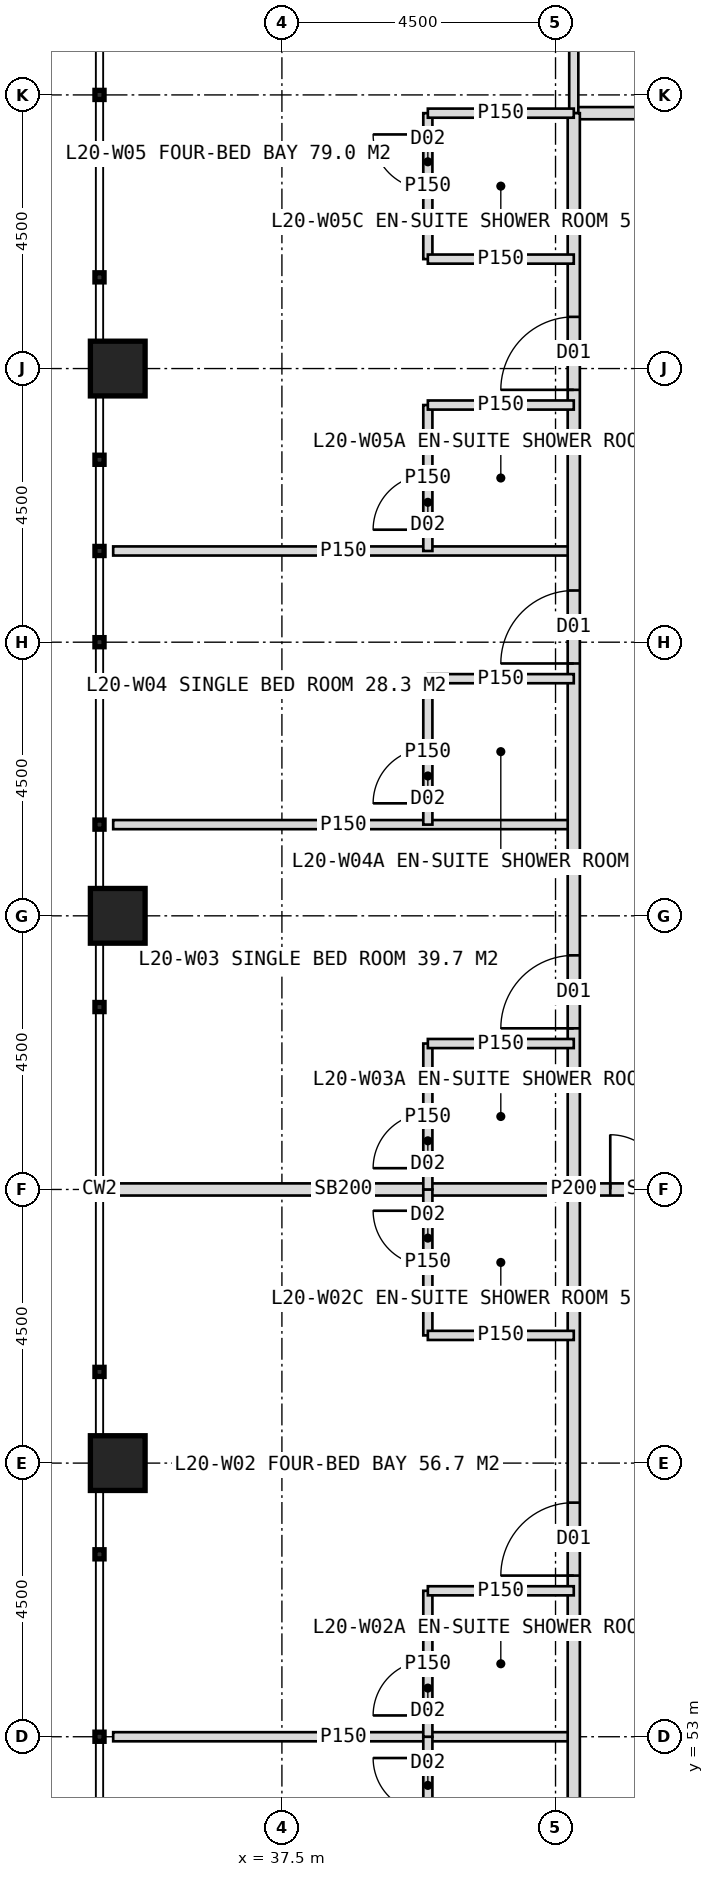
"""IFC4 building model, lengths in metres.
Left out: names, types, materials, properties, quantities, classifications, styles, units other than length and angle.
Written with IfcOpenShell. Run it as: python <this file> out.ifc"""

import sys

from ifc_helpers import new_model, si_unit, direction, frame, frame_2d, origin, origin_2d, place, context, subcontext, project, spatial, rectangle, hollow_rectangle, extrude, element, fill, save


model = new_model("IFC4")
c1 = context("Model", 3, precision=1e-05, world=origin(), true_north=direction((0.0, 1.0)))
c2 = subcontext(c1, "Body", "Model", "MODEL_VIEW")
j1 = project(units=[si_unit("LENGTHUNIT", "METRE"), si_unit("PLANEANGLEUNIT", "RADIAN")], contexts=[c1])
p1 = place(None, origin())
s1 = spatial("IfcSite", under=j1, at=p1, CompositionType="ELEMENT")
p2 = place(p1, origin())
s2 = spatial("IfcBuilding", under=s1, at=p2, CompositionType="ELEMENT")
p3 = place(p2, frame((0.0, 0.0, 87.0)))
s3 = spatial("IfcBuildingStorey", under=s2, at=p3, CompositionType="ELEMENT", Elevation=87.0)
for number, where, z_axis, x_axis in (
    (1, (34.8, 57.5, 0.0), (0.0, 0.0, 1.0), (1.0, 0.0, 0.0)),
    (2, (34.8, 66.5, 0.0), (0.0, 0.0, 1.0), (1.0, 0.0, 0.0)),
    (3, (34.8, 75.5, 0.0), (0.0, 0.0, 1.0), (1.0, 0.0, 0.0)),
):
    element("IfcColumn", number, at=place(p3, frame(where, z_axis=z_axis, x_axis=x_axis)), inside=s3, PredefinedType="COLUMN", context=c2, shape_type="SweptSolid", body=[
        extrude(hollow_rectangle(XDim=0.9, YDim=0.9, WallThickness=0.08, at=origin_2d()), origin(), (0.0, 0.0, 1.0), 4.0),
    ])
p4 = place(p3, frame((42.3, 79.7, 0.0), z_axis=(0.0, 0.0, 1.0), x_axis=(1.0, 0.0, 0.0)))
e4 = element("IfcWall", 4, at=p4, inside=s3, PredefinedType="PARTITIONING", context=c2, shape_type="SweptSolid", body=[
    extrude(rectangle(XDim=35.4, YDim=0.2, at=frame_2d((17.7, 0.0))), origin(), (0.0, 0.0, 1.0), 3.75),
])
p5 = place(p4, frame((2.65, 0.0, 0.0)))
e5 = element("IfcOpeningElement", 5, at=p5, cuts=e4, PredefinedType="OPENING", context=c2, shape_type="SweptSolid", body=[
    extrude(rectangle(XDim=1.2, YDim=2.2, at=frame_2d((0.6, 1.1))), frame((0.0, 0.11, 0.0), z_axis=(0.0, -1.0, 0.0), x_axis=(1.0, 0.0, 0.0)), (0.0, 0.0, 1.0), 0.22),
])
p6 = place(p4, frame((11.2, 0.0, 0.0)))
e6 = element("IfcOpeningElement", 6, at=p6, cuts=e4, PredefinedType="OPENING", context=c2, shape_type="SweptSolid", body=[
    extrude(rectangle(XDim=1.0, YDim=2.1, at=frame_2d((0.5, 1.05))), frame((0.0, 0.11, 0.0), z_axis=(0.0, -1.0, 0.0), x_axis=(1.0, 0.0, 0.0)), (0.0, 0.0, 1.0), 0.22),
])
p7 = place(p4, frame((17.2, 0.0, 0.0)))
e7 = element("IfcOpeningElement", 7, at=p7, cuts=e4, PredefinedType="OPENING", context=c2, shape_type="SweptSolid", body=[
    extrude(rectangle(XDim=1.0, YDim=2.1, at=frame_2d((0.5, 1.05))), frame((0.0, 0.11, 0.0), z_axis=(0.0, -1.0, 0.0), x_axis=(1.0, 0.0, 0.0)), (0.0, 0.0, 1.0), 0.22),
])
p8 = place(p4, frame((23.35, 0.0, 0.0)))
e8 = element("IfcOpeningElement", 8, at=p8, cuts=e4, PredefinedType="OPENING", context=c2, shape_type="SweptSolid", body=[
    extrude(rectangle(XDim=1.2, YDim=2.2, at=frame_2d((0.6, 1.1))), frame((0.0, 0.11, 0.0), z_axis=(0.0, -1.0, 0.0), x_axis=(1.0, 0.0, 0.0)), (0.0, 0.0, 1.0), 0.22),
])
p9 = place(p4, frame((29.35, 0.0, 0.0)))
e9 = element("IfcOpeningElement", 9, at=p9, cuts=e4, PredefinedType="OPENING", context=c2, shape_type="SweptSolid", body=[
    extrude(rectangle(XDim=1.2, YDim=2.2, at=frame_2d((0.6, 1.1))), frame((0.0, 0.11, 0.0), z_axis=(0.0, -1.0, 0.0), x_axis=(1.0, 0.0, 0.0)), (0.0, 0.0, 1.0), 0.22),
])
for number, where, z_axis, x_axis in (
    (10, (42.3, 79.7, 0.0), (0.0, 0.0, 1.0), (0.0, 1.0, 0.0)),
    (11, (42.3, 53.0, 0.0), (0.0, 0.0, 1.0), (-1.0, 0.0, 0.0)),
):
    element("IfcWall", number, at=place(p3, frame(where, z_axis=z_axis, x_axis=x_axis)), inside=s3, PredefinedType="PARTITIONING", context=c2, shape_type="SweptSolid", body=[
        extrude(rectangle(XDim=7.575, YDim=0.15, at=frame_2d((3.788, 0.0))), origin(), (0.0, 0.0, 1.0), 3.75),
    ])
p10 = place(p3, frame((42.3, 62.0, 0.0), z_axis=(0.0, 0.0, 1.0), x_axis=(-1.0, 0.0, 0.0)))
e12 = element("IfcWall", 12, at=p10, inside=s3, PredefinedType="SOLIDWALL", context=c2, shape_type="SweptSolid", body=[
    extrude(rectangle(XDim=7.575, YDim=0.2, at=frame_2d((3.788, 0.0))), origin(), (0.0, 0.0, 1.0), 2.75),
])
for number, where, z_axis, x_axis in (
    (13, (42.3, 68.0, 0.0), (0.0, 0.0, 1.0), (-1.0, 0.0, 0.0)),
    (14, (42.3, 72.5, 0.0), (0.0, 0.0, 1.0), (-1.0, 0.0, 0.0)),
):
    element("IfcWall", number, at=place(p3, frame(where, z_axis=z_axis, x_axis=x_axis)), inside=s3, PredefinedType="PARTITIONING", context=c2, shape_type="SweptSolid", body=[
        extrude(rectangle(XDim=7.575, YDim=0.15, at=frame_2d((3.788, 0.0))), origin(), (0.0, 0.0, 1.0), 3.75),
    ])
p11 = place(p3, frame((42.3, 44.3, 0.0), z_axis=(0.0, 0.0, 1.0), x_axis=(0.0, 1.0, 0.0)))
e15 = element("IfcWall", 15, at=p11, inside=s3, PredefinedType="PARTITIONING", context=c2, shape_type="SweptSolid", body=[
    extrude(rectangle(XDim=35.4, YDim=0.2, at=frame_2d((17.7, 0.0))), origin(), (0.0, 0.0, 1.0), 3.75),
])
p12 = place(p11, frame((2.65, 0.0, 0.0)))
e16 = element("IfcOpeningElement", 16, at=p12, cuts=e15, PredefinedType="OPENING", context=c2, shape_type="SweptSolid", body=[
    extrude(rectangle(XDim=1.2, YDim=2.2, at=frame_2d((0.6, 1.1))), frame((0.0, 0.11, 0.0), z_axis=(0.0, -1.0, 0.0), x_axis=(1.0, 0.0, 0.0)), (0.0, 0.0, 1.0), 0.22),
])
p13 = place(p11, frame((11.35, 0.0, 0.0)))
e17 = element("IfcOpeningElement", 17, at=p13, cuts=e15, PredefinedType="OPENING", context=c2, shape_type="SweptSolid", body=[
    extrude(rectangle(XDim=1.2, YDim=2.2, at=frame_2d((0.6, 1.1))), frame((0.0, 0.11, 0.0), z_axis=(0.0, -1.0, 0.0), x_axis=(1.0, 0.0, 0.0)), (0.0, 0.0, 1.0), 0.22),
])
p14 = place(p11, frame((20.35, 0.0, 0.0)))
e18 = element("IfcOpeningElement", 18, at=p14, cuts=e15, PredefinedType="OPENING", context=c2, shape_type="SweptSolid", body=[
    extrude(rectangle(XDim=1.2, YDim=2.2, at=frame_2d((0.6, 1.1))), frame((0.0, 0.11, 0.0), z_axis=(0.0, -1.0, 0.0), x_axis=(1.0, 0.0, 0.0)), (0.0, 0.0, 1.0), 0.22),
])
p15 = place(p11, frame((26.35, 0.0, 0.0)))
e19 = element("IfcOpeningElement", 19, at=p15, cuts=e15, PredefinedType="OPENING", context=c2, shape_type="SweptSolid", body=[
    extrude(rectangle(XDim=1.2, YDim=2.2, at=frame_2d((0.6, 1.1))), frame((0.0, 0.11, 0.0), z_axis=(0.0, -1.0, 0.0), x_axis=(1.0, 0.0, 0.0)), (0.0, 0.0, 1.0), 0.22),
])
p16 = place(p11, frame((30.85, 0.0, 0.0)))
e20 = element("IfcOpeningElement", 20, at=p16, cuts=e15, PredefinedType="OPENING", context=c2, shape_type="SweptSolid", body=[
    extrude(rectangle(XDim=1.2, YDim=2.2, at=frame_2d((0.6, 1.1))), frame((0.0, 0.11, 0.0), z_axis=(0.0, -1.0, 0.0), x_axis=(1.0, 0.0, 0.0)), (0.0, 0.0, 1.0), 0.22),
])
p17 = place(p3, frame((39.9, 50.6, 0.0), z_axis=(0.0, 0.0, 1.0), x_axis=(0.0, 1.0, 0.0)))
e21 = element("IfcWall", 21, at=p17, inside=s3, PredefinedType="PARTITIONING", context=c2, shape_type="SweptSolid", body=[
    extrude(rectangle(XDim=2.4, YDim=0.15, at=frame_2d((1.2, 0.0))), origin(), (0.0, 0.0, 1.0), 3.75),
])
p18 = place(p17, frame((1.15, 0.0, 0.0)))
e22 = element("IfcOpeningElement", 22, at=p18, cuts=e21, PredefinedType="OPENING", context=c2, shape_type="SweptSolid", body=[
    extrude(rectangle(XDim=0.9, YDim=2.1, at=frame_2d((0.45, 1.05))), frame((0.0, 0.085, 0.0), z_axis=(0.0, -1.0, 0.0), x_axis=(1.0, 0.0, 0.0)), (0.0, 0.0, 1.0), 0.17),
])
p19 = place(p3, frame((39.9, 53.0, 0.0), z_axis=(0.0, 0.0, 1.0), x_axis=(0.0, 1.0, 0.0)))
e23 = element("IfcWall", 23, at=p19, inside=s3, PredefinedType="PARTITIONING", context=c2, shape_type="SweptSolid", body=[
    extrude(rectangle(XDim=2.4, YDim=0.15, at=frame_2d((1.2, 0.0))), origin(), (0.0, 0.0, 1.0), 3.75),
])
p20 = place(p19, frame((0.35, 0.0, 0.0)))
e24 = element("IfcOpeningElement", 24, at=p20, cuts=e23, PredefinedType="OPENING", context=c2, shape_type="SweptSolid", body=[
    extrude(rectangle(XDim=0.9, YDim=2.1, at=frame_2d((0.45, 1.05))), frame((0.0, 0.085, 0.0), z_axis=(0.0, -1.0, 0.0), x_axis=(1.0, 0.0, 0.0)), (0.0, 0.0, 1.0), 0.17),
])
p21 = place(p3, frame((42.3, 55.4, 0.0), z_axis=(0.0, 0.0, 1.0), x_axis=(-1.0, 0.0, 0.0)))
e25 = element("IfcWall", 25, at=p21, inside=s3, PredefinedType="PARTITIONING", context=c2, shape_type="SweptSolid", body=[
    extrude(rectangle(XDim=2.4, YDim=0.15, at=frame_2d((1.2, 0.0))), origin(), (0.0, 0.0, 1.0), 3.75),
])
p22 = place(p3, frame((39.9, 59.6, 0.0), z_axis=(0.0, 0.0, 1.0), x_axis=(0.0, 1.0, 0.0)))
e26 = element("IfcWall", 26, at=p22, inside=s3, PredefinedType="PARTITIONING", context=c2, shape_type="SweptSolid", body=[
    extrude(rectangle(XDim=2.4, YDim=0.15, at=frame_2d((1.2, 0.0))), origin(), (0.0, 0.0, 1.0), 3.75),
])
p23 = place(p22, frame((1.15, 0.0, 0.0)))
e27 = element("IfcOpeningElement", 27, at=p23, cuts=e26, PredefinedType="OPENING", context=c2, shape_type="SweptSolid", body=[
    extrude(rectangle(XDim=0.9, YDim=2.1, at=frame_2d((0.45, 1.05))), frame((0.0, 0.085, 0.0), z_axis=(0.0, -1.0, 0.0), x_axis=(1.0, 0.0, 0.0)), (0.0, 0.0, 1.0), 0.17),
])
p24 = place(p3, frame((42.3, 59.6, 0.0), z_axis=(0.0, 0.0, 1.0), x_axis=(-1.0, 0.0, 0.0)))
e28 = element("IfcWall", 28, at=p24, inside=s3, PredefinedType="PARTITIONING", context=c2, shape_type="SweptSolid", body=[
    extrude(rectangle(XDim=2.4, YDim=0.15, at=frame_2d((1.2, 0.0))), origin(), (0.0, 0.0, 1.0), 3.75),
])
p25 = place(p3, frame((39.9, 62.0, 0.0), z_axis=(0.0, 0.0, 1.0), x_axis=(0.0, 1.0, 0.0)))
e29 = element("IfcWall", 29, at=p25, inside=s3, PredefinedType="PARTITIONING", context=c2, shape_type="SweptSolid", body=[
    extrude(rectangle(XDim=2.4, YDim=0.15, at=frame_2d((1.2, 0.0))), origin(), (0.0, 0.0, 1.0), 3.75),
])
p26 = place(p25, frame((0.35, 0.0, 0.0)))
e30 = element("IfcOpeningElement", 30, at=p26, cuts=e29, PredefinedType="OPENING", context=c2, shape_type="SweptSolid", body=[
    extrude(rectangle(XDim=0.9, YDim=2.1, at=frame_2d((0.45, 1.05))), frame((0.0, 0.085, 0.0), z_axis=(0.0, -1.0, 0.0), x_axis=(1.0, 0.0, 0.0)), (0.0, 0.0, 1.0), 0.17),
])
p27 = place(p3, frame((42.3, 64.4, 0.0), z_axis=(0.0, 0.0, 1.0), x_axis=(-1.0, 0.0, 0.0)))
e31 = element("IfcWall", 31, at=p27, inside=s3, PredefinedType="PARTITIONING", context=c2, shape_type="SweptSolid", body=[
    extrude(rectangle(XDim=2.4, YDim=0.15, at=frame_2d((1.2, 0.0))), origin(), (0.0, 0.0, 1.0), 3.75),
])
p28 = place(p3, frame((39.9, 68.0, 0.0), z_axis=(0.0, 0.0, 1.0), x_axis=(0.0, 1.0, 0.0)))
e32 = element("IfcWall", 32, at=p28, inside=s3, PredefinedType="PARTITIONING", context=c2, shape_type="SweptSolid", body=[
    extrude(rectangle(XDim=2.4, YDim=0.15, at=frame_2d((1.2, 0.0))), origin(), (0.0, 0.0, 1.0), 3.75),
])
p29 = place(p28, frame((0.35, 0.0, 0.0)))
e33 = element("IfcOpeningElement", 33, at=p29, cuts=e32, PredefinedType="OPENING", context=c2, shape_type="SweptSolid", body=[
    extrude(rectangle(XDim=0.9, YDim=2.1, at=frame_2d((0.45, 1.05))), frame((0.0, 0.085, 0.0), z_axis=(0.0, -1.0, 0.0), x_axis=(1.0, 0.0, 0.0)), (0.0, 0.0, 1.0), 0.17),
])
p30 = place(p3, frame((42.3, 70.4, 0.0), z_axis=(0.0, 0.0, 1.0), x_axis=(-1.0, 0.0, 0.0)))
e34 = element("IfcWall", 34, at=p30, inside=s3, PredefinedType="PARTITIONING", context=c2, shape_type="SweptSolid", body=[
    extrude(rectangle(XDim=2.4, YDim=0.15, at=frame_2d((1.2, 0.0))), origin(), (0.0, 0.0, 1.0), 3.75),
])
p31 = place(p3, frame((39.9, 72.5, 0.0), z_axis=(0.0, 0.0, 1.0), x_axis=(0.0, 1.0, 0.0)))
e35 = element("IfcWall", 35, at=p31, inside=s3, PredefinedType="PARTITIONING", context=c2, shape_type="SweptSolid", body=[
    extrude(rectangle(XDim=2.4, YDim=0.15, at=frame_2d((1.2, 0.0))), origin(), (0.0, 0.0, 1.0), 3.75),
])
p32 = place(p31, frame((0.35, 0.0, 0.0)))
e36 = element("IfcOpeningElement", 36, at=p32, cuts=e35, PredefinedType="OPENING", context=c2, shape_type="SweptSolid", body=[
    extrude(rectangle(XDim=0.9, YDim=2.1, at=frame_2d((0.45, 1.05))), frame((0.0, 0.085, 0.0), z_axis=(0.0, -1.0, 0.0), x_axis=(1.0, 0.0, 0.0)), (0.0, 0.0, 1.0), 0.17),
])
p33 = place(p3, frame((42.3, 74.9, 0.0), z_axis=(0.0, 0.0, 1.0), x_axis=(-1.0, 0.0, 0.0)))
e37 = element("IfcWall", 37, at=p33, inside=s3, PredefinedType="PARTITIONING", context=c2, shape_type="SweptSolid", body=[
    extrude(rectangle(XDim=2.4, YDim=0.15, at=frame_2d((1.2, 0.0))), origin(), (0.0, 0.0, 1.0), 3.75),
])
p34 = place(p3, frame((39.9, 77.3, 0.0), z_axis=(0.0, 0.0, 1.0), x_axis=(0.0, 1.0, 0.0)))
e38 = element("IfcWall", 38, at=p34, inside=s3, PredefinedType="PARTITIONING", context=c2, shape_type="SweptSolid", body=[
    extrude(rectangle(XDim=2.4, YDim=0.15, at=frame_2d((1.2, 0.0))), origin(), (0.0, 0.0, 1.0), 3.75),
])
p35 = place(p34, frame((1.15, 0.0, 0.0)))
e39 = element("IfcOpeningElement", 39, at=p35, cuts=e38, PredefinedType="OPENING", context=c2, shape_type="SweptSolid", body=[
    extrude(rectangle(XDim=0.9, YDim=2.1, at=frame_2d((0.45, 1.05))), frame((0.0, 0.085, 0.0), z_axis=(0.0, -1.0, 0.0), x_axis=(1.0, 0.0, 0.0)), (0.0, 0.0, 1.0), 0.17),
])
for number, where, z_axis, x_axis in (
    (40, (42.3, 77.3, 0.0), (0.0, 0.0, 1.0), (-1.0, 0.0, 0.0)),
    (41, (42.3, 79.7, 0.0), (0.0, 0.0, 1.0), (-1.0, 0.0, 0.0)),
):
    element("IfcWall", number, at=place(p3, frame(where, z_axis=z_axis, x_axis=x_axis)), inside=s3, PredefinedType="PARTITIONING", context=c2, shape_type="SweptSolid", body=[
        extrude(rectangle(XDim=2.4, YDim=0.15, at=frame_2d((1.2, 0.0))), origin(), (0.0, 0.0, 1.0), 3.75),
    ])
p36 = place(p3, frame((45.0, 62.0, 0.0), z_axis=(0.0, 0.0, 1.0), x_axis=(-1.0, 0.0, 0.0)))
e42 = element("IfcWall", 42, at=p36, inside=s3, PredefinedType="SOLIDWALL", context=c2, shape_type="SweptSolid", body=[
    extrude(rectangle(XDim=2.7, YDim=0.2, at=frame_2d((1.35, 0.0))), origin(), (0.0, 0.0, 1.0), 2.75),
])
p37 = place(p36, frame((0.3, 0.0, 0.0)))
e43 = element("IfcOpeningElement", 43, at=p37, cuts=e42, PredefinedType="OPENING", context=c2, shape_type="SweptSolid", body=[
    extrude(rectangle(XDim=1.8, YDim=2.2, at=frame_2d((0.9, 1.1))), frame((0.0, 0.11, 0.0), z_axis=(0.0, -1.0, 0.0), x_axis=(1.0, 0.0, 0.0)), (0.0, 0.0, 1.0), 0.22),
])
p38 = place(p18, origin())
e44 = element("IfcDoor", 44, at=p38, inside=s3, OperationType="SINGLE_SWING_RIGHT", PredefinedType="DOOR", context=c2, shape_type="SweptSolid", body=[
    extrude(rectangle(XDim=0.9, YDim=2.1, at=frame_2d((0.45, 1.05))), frame((0.0, 0.025, 0.0), z_axis=(0.0, -1.0, 0.0), x_axis=(1.0, 0.0, 0.0)), (0.0, 0.0, 1.0), 0.05),
])
fill(e22, e44)
p39 = place(p13, origin())
e45 = element("IfcDoor", 45, at=p39, inside=s3, OperationType="SINGLE_SWING_LEFT", PredefinedType="DOOR", context=c2, shape_type="SweptSolid", body=[
    extrude(rectangle(XDim=1.2, YDim=2.2, at=frame_2d((0.6, 1.1))), frame((0.0, 0.025, 0.0), z_axis=(0.0, -1.0, 0.0), x_axis=(1.0, 0.0, 0.0)), (0.0, 0.0, 1.0), 0.05),
])
fill(e17, e45)
p40 = place(p20, origin())
e46 = element("IfcDoor", 46, at=p40, inside=s3, OperationType="SINGLE_SWING_LEFT", PredefinedType="DOOR", context=c2, shape_type="SweptSolid", body=[
    extrude(rectangle(XDim=0.9, YDim=2.1, at=frame_2d((0.45, 1.05))), frame((0.0, 0.025, 0.0), z_axis=(0.0, -1.0, 0.0), x_axis=(1.0, 0.0, 0.0)), (0.0, 0.0, 1.0), 0.05),
])
fill(e24, e46)
p41 = place(p23, origin())
e47 = element("IfcDoor", 47, at=p41, inside=s3, OperationType="SINGLE_SWING_RIGHT", PredefinedType="DOOR", context=c2, shape_type="SweptSolid", body=[
    extrude(rectangle(XDim=0.9, YDim=2.1, at=frame_2d((0.45, 1.05))), frame((0.0, 0.025, 0.0), z_axis=(0.0, -1.0, 0.0), x_axis=(1.0, 0.0, 0.0)), (0.0, 0.0, 1.0), 0.05),
])
fill(e27, e47)
p42 = place(p14, origin())
e48 = element("IfcDoor", 48, at=p42, inside=s3, OperationType="SINGLE_SWING_LEFT", PredefinedType="DOOR", context=c2, shape_type="SweptSolid", body=[
    extrude(rectangle(XDim=1.2, YDim=2.2, at=frame_2d((0.6, 1.1))), frame((0.0, 0.025, 0.0), z_axis=(0.0, -1.0, 0.0), x_axis=(1.0, 0.0, 0.0)), (0.0, 0.0, 1.0), 0.05),
])
fill(e18, e48)
p43 = place(p26, origin())
e49 = element("IfcDoor", 49, at=p43, inside=s3, OperationType="SINGLE_SWING_LEFT", PredefinedType="DOOR", context=c2, shape_type="SweptSolid", body=[
    extrude(rectangle(XDim=0.9, YDim=2.1, at=frame_2d((0.45, 1.05))), frame((0.0, 0.025, 0.0), z_axis=(0.0, -1.0, 0.0), x_axis=(1.0, 0.0, 0.0)), (0.0, 0.0, 1.0), 0.05),
])
fill(e30, e49)
p44 = place(p15, origin())
e50 = element("IfcDoor", 50, at=p44, inside=s3, OperationType="SINGLE_SWING_LEFT", PredefinedType="DOOR", context=c2, shape_type="SweptSolid", body=[
    extrude(rectangle(XDim=1.2, YDim=2.2, at=frame_2d((0.6, 1.1))), frame((0.0, 0.025, 0.0), z_axis=(0.0, -1.0, 0.0), x_axis=(1.0, 0.0, 0.0)), (0.0, 0.0, 1.0), 0.05),
])
fill(e19, e50)
p45 = place(p29, origin())
e51 = element("IfcDoor", 51, at=p45, inside=s3, OperationType="SINGLE_SWING_LEFT", PredefinedType="DOOR", context=c2, shape_type="SweptSolid", body=[
    extrude(rectangle(XDim=0.9, YDim=2.1, at=frame_2d((0.45, 1.05))), frame((0.0, 0.025, 0.0), z_axis=(0.0, -1.0, 0.0), x_axis=(1.0, 0.0, 0.0)), (0.0, 0.0, 1.0), 0.05),
])
fill(e33, e51)
p46 = place(p16, origin())
e52 = element("IfcDoor", 52, at=p46, inside=s3, OperationType="SINGLE_SWING_LEFT", PredefinedType="DOOR", context=c2, shape_type="SweptSolid", body=[
    extrude(rectangle(XDim=1.2, YDim=2.2, at=frame_2d((0.6, 1.1))), frame((0.0, 0.025, 0.0), z_axis=(0.0, -1.0, 0.0), x_axis=(1.0, 0.0, 0.0)), (0.0, 0.0, 1.0), 0.05),
])
fill(e20, e52)
p47 = place(p32, origin())
e53 = element("IfcDoor", 53, at=p47, inside=s3, OperationType="SINGLE_SWING_LEFT", PredefinedType="DOOR", context=c2, shape_type="SweptSolid", body=[
    extrude(rectangle(XDim=0.9, YDim=2.1, at=frame_2d((0.45, 1.05))), frame((0.0, 0.025, 0.0), z_axis=(0.0, -1.0, 0.0), x_axis=(1.0, 0.0, 0.0)), (0.0, 0.0, 1.0), 0.05),
])
fill(e36, e53)
p48 = place(p35, origin())
e54 = element("IfcDoor", 54, at=p48, inside=s3, OperationType="SINGLE_SWING_RIGHT", PredefinedType="DOOR", context=c2, shape_type="SweptSolid", body=[
    extrude(rectangle(XDim=0.9, YDim=2.1, at=frame_2d((0.45, 1.05))), frame((0.0, 0.025, 0.0), z_axis=(0.0, -1.0, 0.0), x_axis=(1.0, 0.0, 0.0)), (0.0, 0.0, 1.0), 0.05),
])
fill(e39, e54)
p49 = place(p37, origin())
e55 = element("IfcDoor", 55, at=p49, inside=s3, OperationType="DOUBLE_DOOR_DOUBLE_SWING", PredefinedType="DOOR", context=c2, shape_type="SweptSolid", body=[
    extrude(rectangle(XDim=1.8, YDim=2.2, at=frame_2d((0.9, 1.1))), frame((0.0, 0.025, 0.0), z_axis=(0.0, -1.0, 0.0), x_axis=(1.0, 0.0, 0.0)), (0.0, 0.0, 1.0), 0.05),
])
fill(e43, e55)
save(model, sys.argv[1])
